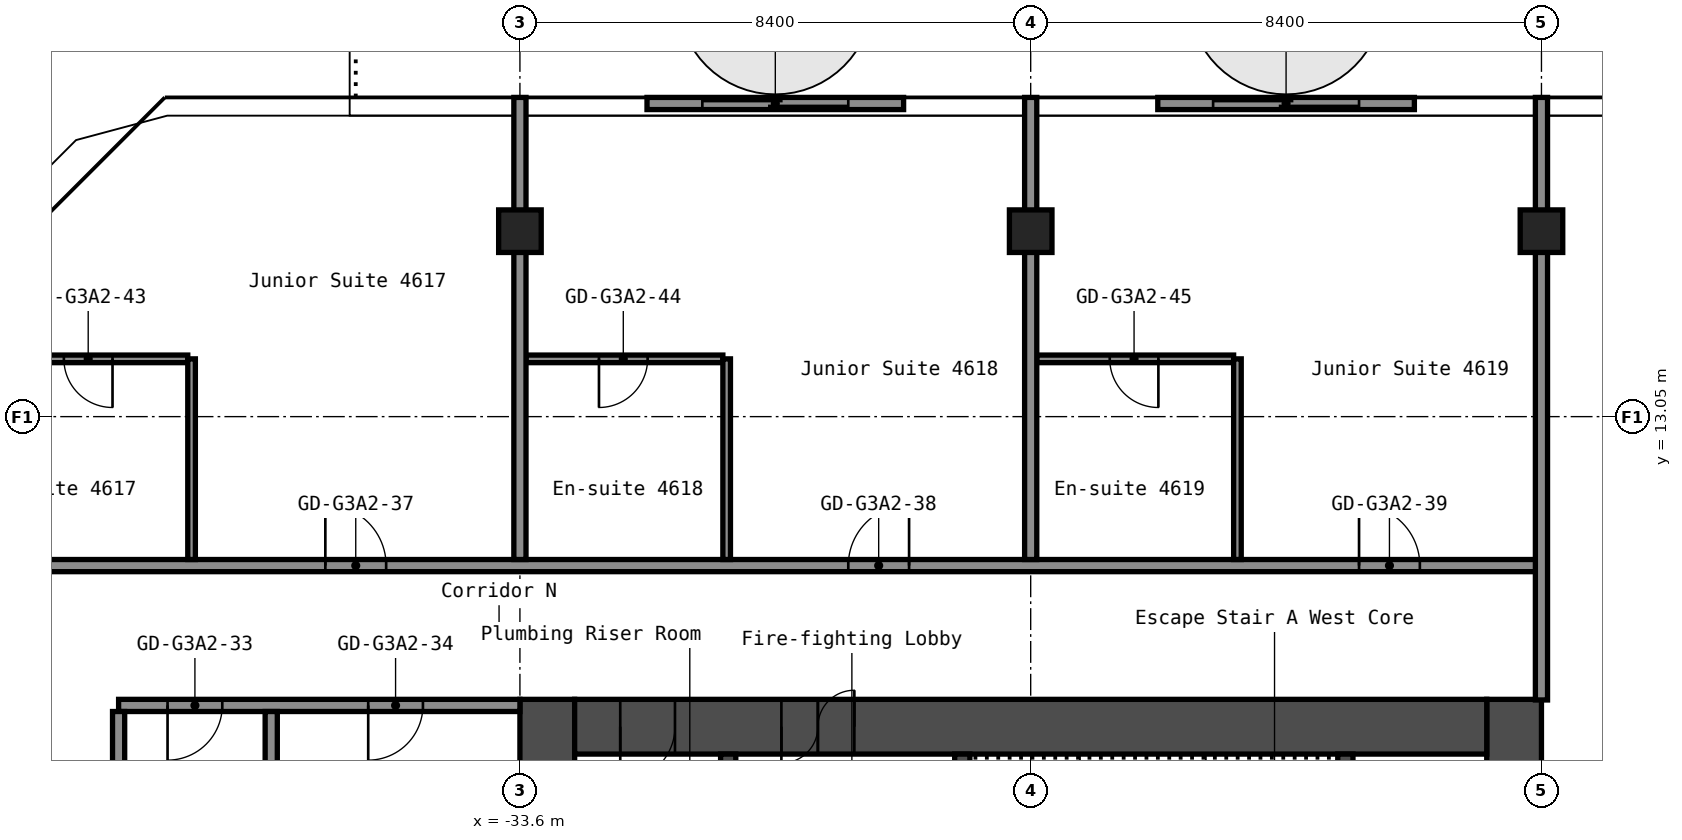
"""IFC4 building model, lengths in metres.
Left out: names, types, materials, properties, quantities, classifications, styles, units other than length and angle.
Written with IfcOpenShell. Run it as: python <this file> out.ifc"""

import sys

from ifc_helpers import new_model, si_unit, direction, frame, frame_2d, origin, origin_2d, place, context, subcontext, project, spatial, rectangle, hollow_rectangle, extrude, element, fill, save


model = new_model("IFC4")
c1 = context("Model", 3, precision=1e-05, world=origin(), true_north=direction((0.0, 1.0)))
c2 = subcontext(c1, "Body", "Model", "MODEL_VIEW")
j1 = project(units=[si_unit("LENGTHUNIT", "METRE"), si_unit("PLANEANGLEUNIT", "RADIAN")], contexts=[c1])
p1 = place(None, origin())
s1 = spatial("IfcSite", under=j1, at=p1, CompositionType="ELEMENT")
p2 = place(p1, origin())
s2 = spatial("IfcBuilding", under=s1, at=p2, CompositionType="ELEMENT")
p3 = place(p2, frame((0.0, 0.0, 163.0)))
s3 = spatial("IfcBuildingStorey", under=s2, at=p3, CompositionType="ELEMENT", Elevation=163.0)
for number, where, z_axis, x_axis in (
    (1, (-33.6, 16.1, 0.0), (0.0, 0.0, 1.0), (1.0, 0.0, 0.0)),
    (2, (-25.2, 16.1, 0.0), (0.0, 0.0, 1.0), (1.0, 0.0, 0.0)),
    (3, (-16.8, 16.1, 0.0), (0.0, 0.0, 1.0), (1.0, 0.0, 0.0)),
):
    element("IfcColumn", number, at=place(p3, frame(where, z_axis=z_axis, x_axis=x_axis)), inside=s3, PredefinedType="COLUMN", context=c2, shape_type="SweptSolid", body=[
        extrude(hollow_rectangle(XDim=0.7, YDim=0.7, WallThickness=0.028, at=origin_2d()), origin(), (0.0, 0.0, 1.0), 2.75),
    ])
p4 = place(p3, frame((-17.25, -8.4, 0.0), z_axis=(0.0, 0.0, 1.0), x_axis=(0.0, 1.0, 0.0)))
e4 = element("IfcWall", 4, at=p4, inside=s3, PredefinedType="SHEAR", context=c2, shape_type="SweptSolid", body=[
    extrude(rectangle(XDim=16.8, YDim=0.9, at=frame_2d((8.4, 0.0))), origin(), (0.0, 0.0, 1.0), 2.75),
])
p5 = place(p4, frame((7.1, 0.0, 0.0)))
e5 = element("IfcOpeningElement", 5, at=p5, cuts=e4, PredefinedType="OPENING", context=c2, shape_type="SweptSolid", body=[
    extrude(rectangle(XDim=1.6, YDim=2.1, at=frame_2d((0.8, 1.05))), frame((0.0, 0.46, 0.0), z_axis=(0.0, -1.0, 0.0), x_axis=(1.0, 0.0, 0.0)), (0.0, 0.0, 1.0), 0.92),
])
p6 = place(p3, frame((-33.15, -8.4, 0.0), z_axis=(0.0, 0.0, 1.0), x_axis=(0.0, 1.0, 0.0)))
e6 = element("IfcWall", 6, at=p6, inside=s3, PredefinedType="SHEAR", context=c2, shape_type="SweptSolid", body=[
    extrude(rectangle(XDim=16.8, YDim=0.9, at=frame_2d((8.4, 0.0))), origin(), (0.0, 0.0, 1.0), 2.75),
])
p7 = place(p3, frame((-32.7, 7.95, 0.0), z_axis=(0.0, 0.0, 1.0), x_axis=(1.0, 0.0, 0.0)))
e7 = element("IfcWall", 7, at=p7, inside=s3, PredefinedType="SHEAR", context=c2, shape_type="SweptSolid", body=[
    extrude(rectangle(XDim=15.0, YDim=0.9, at=frame_2d((7.5, 0.0))), origin(), (0.0, 0.0, 1.0), 2.75),
])
p8 = place(p7, frame((3.4, 0.0, 0.0)))
e8 = element("IfcOpeningElement", 8, at=p8, cuts=e7, PredefinedType="OPENING", context=c2, shape_type="SweptSolid", body=[
    extrude(rectangle(XDim=1.2, YDim=2.1, at=frame_2d((0.6, 1.05))), frame((0.0, 0.46, 0.0), z_axis=(0.0, -1.0, 0.0), x_axis=(1.0, 0.0, 0.0)), (0.0, 0.0, 1.0), 0.92),
])
p9 = place(p7, frame((0.75, 0.0, 0.0)))
e9 = element("IfcOpeningElement", 9, at=p9, cuts=e7, PredefinedType="OPENING", context=c2, shape_type="SweptSolid", body=[
    extrude(rectangle(XDim=0.9, YDim=2.1, at=frame_2d((0.45, 1.05))), frame((0.0, 0.46, 0.0), z_axis=(0.0, -1.0, 0.0), x_axis=(1.0, 0.0, 0.0)), (0.0, 0.0, 1.0), 0.92),
])
p10 = place(p3, frame((-20.025, 1.2, 0.0), z_axis=(0.0, 0.0, 1.0), x_axis=(0.0, 1.0, 0.0)))
e10 = element("IfcWall", 10, at=p10, inside=s3, PredefinedType="SHEAR", context=c2, shape_type="SweptSolid", body=[
    extrude(rectangle(XDim=6.3, YDim=0.25, at=frame_2d((3.15, 0.0))), origin(), (0.0, 0.0, 1.0), 2.75),
])
p11 = place(p3, frame((-26.325, 3.75, 0.0), z_axis=(0.0, 0.0, 1.0), x_axis=(0.0, 1.0, 0.0)))
e11 = element("IfcWall", 11, at=p11, inside=s3, PredefinedType="SHEAR", context=c2, shape_type="SweptSolid", body=[
    extrude(rectangle(XDim=3.75, YDim=0.25, at=frame_2d((1.875, 0.0))), origin(), (0.0, 0.0, 1.0), 2.75),
])
p12 = place(p11, frame((1.25, 0.0, 0.0)))
e12 = element("IfcOpeningElement", 12, at=p12, cuts=e11, PredefinedType="OPENING", context=c2, shape_type="SweptSolid", body=[
    extrude(rectangle(XDim=1.2, YDim=2.1, at=frame_2d((0.6, 1.05))), frame((0.0, 0.135, 0.0), z_axis=(0.0, -1.0, 0.0), x_axis=(1.0, 0.0, 0.0)), (0.0, 0.0, 1.0), 0.27),
])
p13 = place(p3, frame((-30.175, 1.45, 0.0), z_axis=(0.0, 0.0, 1.0), x_axis=(0.0, 1.0, 0.0)))
e13 = element("IfcWall", 13, at=p13, inside=s3, PredefinedType="SHEAR", context=c2, shape_type="SweptSolid", body=[
    extrude(rectangle(XDim=6.05, YDim=0.25, at=frame_2d((3.025, 0.0))), origin(), (0.0, 0.0, 1.0), 2.75),
])
p14 = place(p13, frame((2.625, 0.0, 0.0)))
e14 = element("IfcOpeningElement", 14, at=p14, cuts=e13, PredefinedType="OPENING", context=c2, shape_type="SweptSolid", body=[
    extrude(rectangle(XDim=1.1, YDim=2.1, at=frame_2d((0.55, 1.05))), frame((0.0, 0.135, 0.0), z_axis=(0.0, -1.0, 0.0), x_axis=(1.0, 0.0, 0.0)), (0.0, 0.0, 1.0), 0.27),
])
p15 = place(p3, frame((-40.2, 8.3, 0.0), z_axis=(0.0, 0.0, 1.0), x_axis=(1.0, 0.0, 0.0)))
e15 = element("IfcWall", 15, at=p15, inside=s3, PredefinedType="PARTITIONING", context=c2, shape_type="SweptSolid", body=[
    extrude(rectangle(XDim=6.6, YDim=0.2, at=frame_2d((3.3, 0.0))), origin(), (0.0, 0.0, 1.0), 2.75),
])
p16 = place(p15, frame((0.805, 0.0, 0.0)))
e16 = element("IfcOpeningElement", 16, at=p16, cuts=e15, PredefinedType="OPENING", context=c2, shape_type="SweptSolid", body=[
    extrude(rectangle(XDim=0.9, YDim=2.1, at=frame_2d((0.45, 1.05))), frame((0.0, 0.11, 0.0), z_axis=(0.0, -1.0, 0.0), x_axis=(1.0, 0.0, 0.0)), (0.0, 0.0, 1.0), 0.22),
])
p17 = place(p15, frame((4.105, 0.0, 0.0)))
e17 = element("IfcOpeningElement", 17, at=p17, cuts=e15, PredefinedType="OPENING", context=c2, shape_type="SweptSolid", body=[
    extrude(rectangle(XDim=0.9, YDim=2.1, at=frame_2d((0.45, 1.05))), frame((0.0, 0.11, 0.0), z_axis=(0.0, -1.0, 0.0), x_axis=(1.0, 0.0, 0.0)), (0.0, 0.0, 1.0), 0.22),
])
p18 = place(p3, frame((-42.7, 10.6, 0.0), z_axis=(0.0, 0.0, 1.0), x_axis=(1.0, 0.0, 0.0)))
e18 = element("IfcWall", 18, at=p18, inside=s3, PredefinedType="PARTITIONING", context=c2, shape_type="SweptSolid", body=[
    extrude(rectangle(XDim=25.9, YDim=0.2, at=frame_2d((12.95, 0.0))), origin(), (0.0, 0.0, 1.0), 2.75),
])
p19 = place(p18, frame((5.9, 0.0, 0.0)))
e19 = element("IfcOpeningElement", 19, at=p19, cuts=e18, PredefinedType="OPENING", context=c2, shape_type="SweptSolid", body=[
    extrude(rectangle(XDim=1.0, YDim=2.1, at=frame_2d((0.5, 1.05))), frame((0.0, 0.11, 0.0), z_axis=(0.0, -1.0, 0.0), x_axis=(1.0, 0.0, 0.0)), (0.0, 0.0, 1.0), 0.22),
])
p20 = place(p18, frame((14.5, 0.0, 0.0)))
e20 = element("IfcOpeningElement", 20, at=p20, cuts=e18, PredefinedType="OPENING", context=c2, shape_type="SweptSolid", body=[
    extrude(rectangle(XDim=1.0, YDim=2.1, at=frame_2d((0.5, 1.05))), frame((0.0, 0.11, 0.0), z_axis=(0.0, -1.0, 0.0), x_axis=(1.0, 0.0, 0.0)), (0.0, 0.0, 1.0), 0.22),
])
p21 = place(p18, frame((22.9, 0.0, 0.0)))
e21 = element("IfcOpeningElement", 21, at=p21, cuts=e18, PredefinedType="OPENING", context=c2, shape_type="SweptSolid", body=[
    extrude(rectangle(XDim=1.0, YDim=2.1, at=frame_2d((0.5, 1.05))), frame((0.0, 0.11, 0.0), z_axis=(0.0, -1.0, 0.0), x_axis=(1.0, 0.0, 0.0)), (0.0, 0.0, 1.0), 0.22),
])
p22 = place(p3, frame((-42.7, 14.0, 0.0), z_axis=(0.0, 0.0, 1.0), x_axis=(1.0, 0.0, 0.0)))
e22 = element("IfcWall", 22, at=p22, inside=s3, PredefinedType="PARTITIONING", context=c2, shape_type="SweptSolid", body=[
    extrude(rectangle(XDim=3.637, YDim=0.125, at=frame_2d((1.819, 0.0))), origin(), (0.0, 0.0, 1.0), 2.75),
])
p23 = place(p22, frame((1.6, 0.0, 0.0)))
e23 = element("IfcOpeningElement", 23, at=p23, cuts=e22, PredefinedType="OPENING", context=c2, shape_type="SweptSolid", body=[
    extrude(rectangle(XDim=0.8, YDim=2.1, at=frame_2d((0.4, 1.05))), frame((0.0, 0.073, 0.0), z_axis=(0.0, -1.0, 0.0), x_axis=(1.0, 0.0, 0.0)), (0.0, 0.0, 1.0), 0.145),
])
p24 = place(p3, frame((-33.5, 14.0, 0.0), z_axis=(0.0, 0.0, 1.0), x_axis=(1.0, 0.0, 0.0)))
e24 = element("IfcWall", 24, at=p24, inside=s3, PredefinedType="PARTITIONING", context=c2, shape_type="SweptSolid", body=[
    extrude(rectangle(XDim=3.238, YDim=0.125, at=frame_2d((1.619, 0.0))), origin(), (0.0, 0.0, 1.0), 2.75),
])
p25 = place(p24, frame((1.2, 0.0, 0.0)))
e25 = element("IfcOpeningElement", 25, at=p25, cuts=e24, PredefinedType="OPENING", context=c2, shape_type="SweptSolid", body=[
    extrude(rectangle(XDim=0.8, YDim=2.1, at=frame_2d((0.4, 1.05))), frame((0.0, 0.073, 0.0), z_axis=(0.0, -1.0, 0.0), x_axis=(1.0, 0.0, 0.0)), (0.0, 0.0, 1.0), 0.145),
])
p26 = place(p3, frame((-25.1, 14.0, 0.0), z_axis=(0.0, 0.0, 1.0), x_axis=(1.0, 0.0, 0.0)))
e26 = element("IfcWall", 26, at=p26, inside=s3, PredefinedType="PARTITIONING", context=c2, shape_type="SweptSolid", body=[
    extrude(rectangle(XDim=3.238, YDim=0.125, at=frame_2d((1.619, 0.0))), origin(), (0.0, 0.0, 1.0), 2.75),
])
p27 = place(p26, frame((1.2, 0.0, 0.0)))
e27 = element("IfcOpeningElement", 27, at=p27, cuts=e26, PredefinedType="OPENING", context=c2, shape_type="SweptSolid", body=[
    extrude(rectangle(XDim=0.8, YDim=2.1, at=frame_2d((0.4, 1.05))), frame((0.0, 0.073, 0.0), z_axis=(0.0, -1.0, 0.0), x_axis=(1.0, 0.0, 0.0)), (0.0, 0.0, 1.0), 0.145),
])
p28 = place(p3, frame((-40.2, -8.2, 0.0), z_axis=(0.0, 0.0, 1.0), x_axis=(0.0, 1.0, 0.0)))
e28 = element("IfcWall", 28, at=p28, inside=s3, PredefinedType="PARTITIONING", context=c2, shape_type="SweptSolid", body=[
    extrude(rectangle(XDim=16.4, YDim=0.2, at=frame_2d((8.2, 0.0))), origin(), (0.0, 0.0, 1.0), 2.75),
])
p29 = place(p3, frame((-39.0, 10.7, 0.0), z_axis=(0.0, 0.0, 1.0), x_axis=(0.0, 1.0, 0.0)))
e29 = element("IfcWall", 29, at=p29, inside=s3, PredefinedType="PARTITIONING", context=c2, shape_type="SweptSolid", body=[
    extrude(rectangle(XDim=3.3, YDim=0.125, at=frame_2d((1.65, 0.0))), origin(), (0.0, 0.0, 1.0), 2.75),
])
p30 = place(p3, frame((-37.69, 0.0, 0.0), z_axis=(0.0, 0.0, 1.0), x_axis=(0.0, 1.0, 0.0)))
e30 = element("IfcWall", 30, at=p30, inside=s3, PredefinedType="PARTITIONING", context=c2, shape_type="SweptSolid", body=[
    extrude(rectangle(XDim=8.2, YDim=0.2, at=frame_2d((4.1, 0.0))), origin(), (0.0, 0.0, 1.0), 2.75),
])
p31 = place(p3, frame((-33.6, 10.7, 0.0), z_axis=(0.0, 0.0, 1.0), x_axis=(0.0, 1.0, 0.0)))
e31 = element("IfcWall", 31, at=p31, inside=s3, PredefinedType="PARTITIONING", context=c2, shape_type="SweptSolid", body=[
    extrude(rectangle(XDim=7.6, YDim=0.2, at=frame_2d((3.8, 0.0))), origin(), (0.0, 0.0, 1.0), 2.75),
])
p32 = place(p3, frame((-30.2, 10.7, 0.0), z_axis=(0.0, 0.0, 1.0), x_axis=(0.0, 1.0, 0.0)))
e32 = element("IfcWall", 32, at=p32, inside=s3, PredefinedType="PARTITIONING", context=c2, shape_type="SweptSolid", body=[
    extrude(rectangle(XDim=3.3, YDim=0.125, at=frame_2d((1.65, 0.0))), origin(), (0.0, 0.0, 1.0), 2.75),
])
p33 = place(p3, frame((-25.2, 10.7, 0.0), z_axis=(0.0, 0.0, 1.0), x_axis=(0.0, 1.0, 0.0)))
e33 = element("IfcWall", 33, at=p33, inside=s3, PredefinedType="PARTITIONING", context=c2, shape_type="SweptSolid", body=[
    extrude(rectangle(XDim=7.6, YDim=0.2, at=frame_2d((3.8, 0.0))), origin(), (0.0, 0.0, 1.0), 2.75),
])
p34 = place(p3, frame((-21.8, 10.7, 0.0), z_axis=(0.0, 0.0, 1.0), x_axis=(0.0, 1.0, 0.0)))
e34 = element("IfcWall", 34, at=p34, inside=s3, PredefinedType="PARTITIONING", context=c2, shape_type="SweptSolid", body=[
    extrude(rectangle(XDim=3.3, YDim=0.125, at=frame_2d((1.65, 0.0))), origin(), (0.0, 0.0, 1.0), 2.75),
])
p35 = place(p3, frame((-16.8, 8.39, 0.0), z_axis=(0.0, 0.0, 1.0), x_axis=(0.0, 1.0, 0.0)))
e35 = element("IfcWall", 35, at=p35, inside=s3, PredefinedType="PARTITIONING", context=c2, shape_type="SweptSolid", body=[
    extrude(rectangle(XDim=9.91, YDim=0.2, at=frame_2d((4.955, 0.0))), origin(), (0.0, 0.0, 1.0), 2.75),
])
p36 = place(p3, frame((-18.89, 18.2, 0.0), z_axis=(0.0, 0.0, 1.0), x_axis=(-1.0, 0.0, 0.0)))
p37 = place(p36, frame((0.91, 0.0, 0.0)))
p38 = place(p37, frame((2.4, 0.0, 0.0), z_axis=(0.0, 0.0, 1.0), x_axis=(-1.0, 0.0, 0.0)))
e36 = element("IfcDoor", 36, at=p38, inside=s3, OperationType="SLIDING_TO_LEFT", PredefinedType="DOOR", context=c2, shape_type="SweptSolid", body=[
    extrude(rectangle(XDim=2.4, YDim=2.2, at=frame_2d((1.2, 1.1))), frame((0.0, 0.025, 0.0), z_axis=(0.0, -1.0, 0.0), x_axis=(1.0, 0.0, 0.0)), (0.0, 0.0, 1.0), 0.05),
])
p39 = place(p3, frame((-27.29, 18.2, 0.0), z_axis=(0.0, 0.0, 1.0), x_axis=(-1.0, 0.0, 0.0)))
p40 = place(p39, frame((0.91, 0.0, 0.0)))
p41 = place(p40, frame((2.4, 0.0, 0.0), z_axis=(0.0, 0.0, 1.0), x_axis=(-1.0, 0.0, 0.0)))
e37 = element("IfcDoor", 37, at=p41, inside=s3, OperationType="SLIDING_TO_LEFT", PredefinedType="DOOR", context=c2, shape_type="SweptSolid", body=[
    extrude(rectangle(XDim=2.4, YDim=2.2, at=frame_2d((1.2, 1.1))), frame((0.0, 0.025, 0.0), z_axis=(0.0, -1.0, 0.0), x_axis=(1.0, 0.0, 0.0)), (0.0, 0.0, 1.0), 0.05),
])
p42 = place(p8, origin())
e38 = element("IfcDoor", 38, at=p42, inside=s3, OperationType="DOUBLE_DOOR_SINGLE_SWING", PredefinedType="DOOR", context=c2, shape_type="SweptSolid", body=[
    extrude(rectangle(XDim=1.2, YDim=2.1, at=frame_2d((0.6, 1.05))), frame((0.0, 0.025, 0.0), z_axis=(0.0, -1.0, 0.0), x_axis=(1.0, 0.0, 0.0)), (0.0, 0.0, 1.0), 0.05),
])
fill(e8, e38)
p43 = place(p9, origin())
e39 = element("IfcDoor", 39, at=p43, inside=s3, OperationType="SINGLE_SWING_LEFT", PredefinedType="DOOR", context=c2, shape_type="SweptSolid", body=[
    extrude(rectangle(XDim=0.9, YDim=2.1, at=frame_2d((0.45, 1.05))), frame((0.0, 0.025, 0.0), z_axis=(0.0, -1.0, 0.0), x_axis=(1.0, 0.0, 0.0)), (0.0, 0.0, 1.0), 0.05),
])
fill(e9, e39)
p44 = place(p16, origin())
e40 = element("IfcDoor", 40, at=p44, inside=s3, OperationType="SINGLE_SWING_LEFT", PredefinedType="DOOR", context=c2, shape_type="SweptSolid", body=[
    extrude(rectangle(XDim=0.9, YDim=2.1, at=frame_2d((0.45, 1.05))), frame((0.0, 0.025, 0.0), z_axis=(0.0, -1.0, 0.0), x_axis=(1.0, 0.0, 0.0)), (0.0, 0.0, 1.0), 0.05),
])
fill(e16, e40)
p45 = place(p17, origin())
e41 = element("IfcDoor", 41, at=p45, inside=s3, OperationType="SINGLE_SWING_LEFT", PredefinedType="DOOR", context=c2, shape_type="SweptSolid", body=[
    extrude(rectangle(XDim=0.9, YDim=2.1, at=frame_2d((0.45, 1.05))), frame((0.0, 0.025, 0.0), z_axis=(0.0, -1.0, 0.0), x_axis=(1.0, 0.0, 0.0)), (0.0, 0.0, 1.0), 0.05),
])
fill(e17, e41)
p46 = place(p19, origin())
e42 = element("IfcDoor", 42, at=p46, inside=s3, OperationType="SINGLE_SWING_RIGHT", PredefinedType="DOOR", context=c2, shape_type="SweptSolid", body=[
    extrude(rectangle(XDim=1.0, YDim=2.1, at=frame_2d((0.5, 1.05))), frame((0.0, 0.025, 0.0), z_axis=(0.0, -1.0, 0.0), x_axis=(1.0, 0.0, 0.0)), (0.0, 0.0, 1.0), 0.05),
])
fill(e19, e42)
p47 = place(p20, origin())
e43 = element("IfcDoor", 43, at=p47, inside=s3, OperationType="SINGLE_SWING_LEFT", PredefinedType="DOOR", context=c2, shape_type="SweptSolid", body=[
    extrude(rectangle(XDim=1.0, YDim=2.1, at=frame_2d((0.5, 1.05))), frame((0.0, 0.025, 0.0), z_axis=(0.0, -1.0, 0.0), x_axis=(1.0, 0.0, 0.0)), (0.0, 0.0, 1.0), 0.05),
])
fill(e20, e43)
p48 = place(p21, origin())
e44 = element("IfcDoor", 44, at=p48, inside=s3, OperationType="SINGLE_SWING_RIGHT", PredefinedType="DOOR", context=c2, shape_type="SweptSolid", body=[
    extrude(rectangle(XDim=1.0, YDim=2.1, at=frame_2d((0.5, 1.05))), frame((0.0, 0.025, 0.0), z_axis=(0.0, -1.0, 0.0), x_axis=(1.0, 0.0, 0.0)), (0.0, 0.0, 1.0), 0.05),
])
fill(e21, e44)
p49 = place(p23, origin())
e45 = element("IfcDoor", 45, at=p49, inside=s3, OperationType="SINGLE_SWING_RIGHT", PredefinedType="DOOR", context=c2, shape_type="SweptSolid", body=[
    extrude(rectangle(XDim=0.8, YDim=2.1, at=frame_2d((0.4, 1.05))), frame((0.0, 0.025, 0.0), z_axis=(0.0, -1.0, 0.0), x_axis=(1.0, 0.0, 0.0)), (0.0, 0.0, 1.0), 0.05),
])
fill(e23, e45)
p50 = place(p25, origin())
e46 = element("IfcDoor", 46, at=p50, inside=s3, OperationType="SINGLE_SWING_LEFT", PredefinedType="DOOR", context=c2, shape_type="SweptSolid", body=[
    extrude(rectangle(XDim=0.8, YDim=2.1, at=frame_2d((0.4, 1.05))), frame((0.0, 0.025, 0.0), z_axis=(0.0, -1.0, 0.0), x_axis=(1.0, 0.0, 0.0)), (0.0, 0.0, 1.0), 0.05),
])
fill(e25, e46)
p51 = place(p27, origin())
e47 = element("IfcDoor", 47, at=p51, inside=s3, OperationType="SINGLE_SWING_RIGHT", PredefinedType="DOOR", context=c2, shape_type="SweptSolid", body=[
    extrude(rectangle(XDim=0.8, YDim=2.1, at=frame_2d((0.4, 1.05))), frame((0.0, 0.025, 0.0), z_axis=(0.0, -1.0, 0.0), x_axis=(1.0, 0.0, 0.0)), (0.0, 0.0, 1.0), 0.05),
])
fill(e27, e47)
save(model, sys.argv[1])
